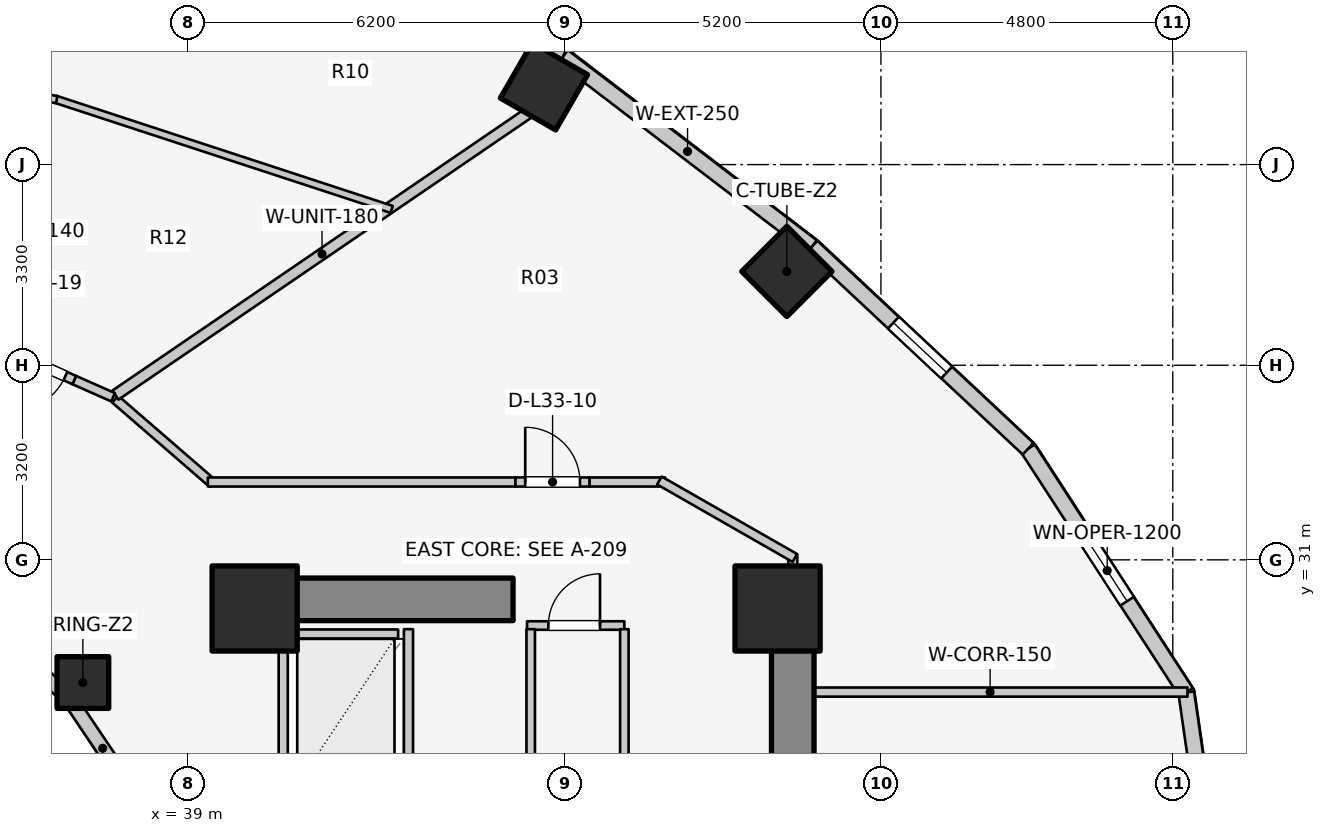
"""IFC4 building model, lengths in metres.
Left out: names, types, materials, properties, quantities, classifications, styles, units other than length and angle.
Written with IfcOpenShell. Run it as: python <this file> out.ifc"""

import sys

from ifc_helpers import new_model, si_unit, direction, frame, frame_2d, origin, origin_2d, place, context, subcontext, project, spatial, rectangle, extrude, element, fill, save


model = new_model("IFC4")
c1 = context("Model", 3, precision=1e-05, world=origin(), true_north=direction((0.0, 1.0)))
c2 = subcontext(c1, "Body", "Model", "MODEL_VIEW")
j1 = project(units=[si_unit("LENGTHUNIT", "METRE"), si_unit("PLANEANGLEUNIT", "RADIAN")], contexts=[c1])
p1 = place(None, origin())
s1 = spatial("IfcSite", under=j1, at=p1, CompositionType="ELEMENT")
p2 = place(p1, origin())
s2 = spatial("IfcBuilding", under=s1, at=p2, CompositionType="ELEMENT")
p3 = place(p2, frame((0.0, 0.0, 110.4)))
s3 = spatial("IfcBuildingStorey", under=s2, at=p3, CompositionType="ELEMENT", Elevation=110.4)
p4 = place(p3, frame((48.95, 17.05, 0.0), z_axis=(0.0, 0.0, 1.0), x_axis=(0.0, 1.0, 0.0)))
e1 = element("IfcWall", 1, at=p4, inside=s3, PredefinedType="SHEAR", context=c2, shape_type="SweptSolid", body=[
    extrude(rectangle(XDim=12.8, YDim=0.7, at=frame_2d((6.4, 0.0))), origin(), (0.0, 0.0, 1.0), 3.1),
])
p5 = place(p3, frame((39.85, 30.35, 0.0), z_axis=(0.0, 0.0, 1.0), x_axis=(1.0, 0.0, 0.0)))
e2 = element("IfcWall", 2, at=p5, inside=s3, PredefinedType="SHEAR", context=c2, shape_type="SweptSolid", body=[
    extrude(rectangle(XDim=4.5, YDim=0.7, at=frame_2d((2.25, 0.0))), origin(), (0.0, 0.0, 1.0), 3.1),
])
for number, where, z_axis, x_axis in (
    (3, (48.7, 30.2, 0.0), (0.0, 0.0, 1.0), (1.0, 0.0, 0.0)),
    (4, (40.1, 30.2, 0.0), (0.0, 0.0, 1.0), (1.0, 0.0, 0.0)),
):
    element("IfcColumn", number, at=place(p3, frame(where, z_axis=z_axis, x_axis=x_axis)), inside=s3, PredefinedType="COLUMN", context=c2, shape_type="SweptSolid", body=[
        extrude(rectangle(XDim=1.4, YDim=1.4, at=origin_2d()), origin(), (0.0, 0.0, 1.0), 3.1),
    ])
p6 = place(p3, frame((37.275, 28.982, 0.0), z_axis=(0.0, 0.0, 1.0), x_axis=(1.0, 0.0, 0.0)))
e5 = element("IfcColumn", 5, at=p6, inside=s3, PredefinedType="COLUMN", context=c2, shape_type="SweptSolid", body=[
    extrude(rectangle(XDim=0.85, YDim=0.85, at=origin_2d()), origin(), (0.0, 0.0, 1.0), 3.1),
])
for number, where, z_axis, x_axis in (
    (6, (48.853, 35.743, 0.0), (0.0, 0.0, 1.0), (0.707, 0.707, 0.0)),
    (7, (44.858, 38.786, 0.0), (0.0, 0.0, 1.0), (0.5, 0.866, 0.0)),
):
    element("IfcColumn", number, at=place(p3, frame(where, z_axis=z_axis, x_axis=x_axis)), inside=s3, PredefinedType="COLUMN", context=c2, shape_type="SweptSolid", body=[
        extrude(rectangle(XDim=1.05, YDim=1.05, at=origin_2d()), origin(), (0.0, 0.0, 1.0), 3.1),
    ])
p7 = place(p3, frame((38.166, 27.06, 0.0), z_axis=(0.0, 0.0, 1.0), x_axis=(-0.558197800898, 0.829707909492, 0.0)))
e8 = element("IfcWall", 8, at=p7, inside=s3, PredefinedType="STANDARD", context=c2, shape_type="SweptSolid", body=[
    extrude(rectangle(XDim=2.027, YDim=0.23, at=frame_2d((1.013, 0.0))), origin(), (0.0, 0.0, 1.0), 1.22),
])
p8 = place(p3, frame((37.035, 28.742, 0.0), z_axis=(0.0, 0.0, 1.0), x_axis=(-0.752576694707, 0.658504607869, 0.0)))
e9 = element("IfcWall", 9, at=p8, inside=s3, PredefinedType="STANDARD", context=c2, shape_type="SweptSolid", body=[
    extrude(rectangle(XDim=1.959, YDim=0.23, at=frame_2d((0.98, 0.0))), origin(), (0.0, 0.0, 1.0), 1.22),
])
p9 = place(p3, frame((56.26, 23.0, 0.0), z_axis=(0.0, 0.0, 1.0), x_axis=(-0.142572472068, 0.98978436551, 0.0)))
e10 = element("IfcWall", 10, at=p9, inside=s3, PredefinedType="STANDARD", context=c2, shape_type="SweptSolid", body=[
    extrude(rectangle(XDim=5.879, YDim=0.26, at=frame_2d((2.939, 0.0))), origin(), (0.0, 0.0, 1.0), 2.57),
])
p10 = place(p9, frame((2.189, 0.0, 0.75)))
e11 = element("IfcOpeningElement", 11, at=p10, cuts=e10, PredefinedType="OPENING", context=c2, shape_type="SweptSolid", body=[
    extrude(rectangle(XDim=1.5, YDim=1.6, at=frame_2d((0.75, 0.8))), frame((0.0, 0.14, 0.0), z_axis=(0.0, -1.0, 0.0), x_axis=(1.0, 0.0, 0.0)), (0.0, 0.0, 1.0), 0.28),
])
p11 = place(p3, frame((55.422, 28.819, 0.0), z_axis=(0.0, 0.0, 1.0), x_axis=(-0.544388392991, 0.838833283541, 0.0)))
e12 = element("IfcWall", 12, at=p11, inside=s3, PredefinedType="STANDARD", context=c2, shape_type="SweptSolid", body=[
    extrude(rectangle(XDim=4.778, YDim=0.26, at=frame_2d((2.389, 0.0))), origin(), (0.0, 0.0, 1.0), 1.22),
])
p12 = place(p11, frame((1.789, 0.0, 0.15)))
e13 = element("IfcOpeningElement", 13, at=p12, cuts=e12, PredefinedType="OPENING", context=c2, shape_type="SweptSolid", body=[
    extrude(rectangle(XDim=1.2, YDim=0.9, at=frame_2d((0.6, 0.45))), frame((0.0, 0.14, 0.0), z_axis=(0.0, -1.0, 0.0), x_axis=(1.0, 0.0, 0.0)), (0.0, 0.0, 1.0), 0.28),
])
p13 = place(p3, frame((52.821, 32.827, 0.0), z_axis=(0.0, 0.0, 1.0), x_axis=(-0.730162452258, 0.68327358599, 0.0)))
e14 = element("IfcWall", 14, at=p13, inside=s3, PredefinedType="STANDARD", context=c2, shape_type="SweptSolid", body=[
    extrude(rectangle(XDim=4.868, YDim=0.26, at=frame_2d((2.434, 0.0))), origin(), (0.0, 0.0, 1.0), 1.22),
])
p14 = place(p13, frame((1.834, 0.0, 0.15)))
e15 = element("IfcOpeningElement", 15, at=p14, cuts=e14, PredefinedType="OPENING", context=c2, shape_type="SweptSolid", body=[
    extrude(rectangle(XDim=1.2, YDim=0.9, at=frame_2d((0.6, 0.45))), frame((0.0, 0.14, 0.0), z_axis=(0.0, -1.0, 0.0), x_axis=(1.0, 0.0, 0.0)), (0.0, 0.0, 1.0), 0.28),
])
p15 = place(p3, frame((49.266, 36.153, 0.0), z_axis=(0.0, 0.0, 1.0), x_axis=(-0.794809810864, 0.606858603427, 0.0)))
e16 = element("IfcWall", 16, at=p15, inside=s3, PredefinedType="STANDARD", context=c2, shape_type="SweptSolid", body=[
    extrude(rectangle(XDim=5.149, YDim=0.26, at=frame_2d((2.575, 0.0))), origin(), (0.0, 0.0, 1.0), 1.22),
])
p16 = place(p3, frame((45.173, 39.278, 0.0), z_axis=(0.0, 0.0, 1.0), x_axis=(-0.914336605747, 0.404955023911, 0.0)))
e17 = element("IfcWall", 17, at=p16, inside=s3, PredefinedType="STANDARD", context=c2, shape_type="SweptSolid", body=[
    extrude(rectangle(XDim=5.859, YDim=0.26, at=frame_2d((2.929, 0.0))), origin(), (0.0, 0.0, 1.0), 1.22),
])
p17 = place(p16, frame((2.329, 0.0, 0.15)))
e18 = element("IfcOpeningElement", 18, at=p17, cuts=e17, PredefinedType="OPENING", context=c2, shape_type="SweptSolid", body=[
    extrude(rectangle(XDim=1.2, YDim=0.9, at=frame_2d((0.6, 0.45))), frame((0.0, 0.14, 0.0), z_axis=(0.0, -1.0, 0.0), x_axis=(1.0, 0.0, 0.0)), (0.0, 0.0, 1.0), 0.28),
])
p18 = place(p3, frame((40.74, 29.78, 0.0), z_axis=(0.0, 0.0, 1.0), x_axis=(1.0, 0.0, 0.0)))
e19 = element("IfcWall", 19, at=p18, inside=s3, PredefinedType="SOLIDWALL", context=c2, shape_type="SweptSolid", body=[
    extrude(rectangle(XDim=1.72, YDim=0.15, at=frame_2d((0.86, 0.0))), origin(), (0.0, 0.0, 1.0), 2.575),
])
for number, where, z_axis, x_axis in (
    (20, (40.57, 27.14, 0.0), (0.0, 0.0, 1.0), (0.0, 1.0, 0.0)),
    (21, (42.63, 27.14, 0.0), (0.0, 0.0, 1.0), (0.0, 1.0, 0.0)),
):
    element("IfcWall", number, at=place(p3, frame(where, z_axis=z_axis, x_axis=x_axis)), inside=s3, PredefinedType="SOLIDWALL", context=c2, shape_type="SweptSolid", body=[
        extrude(rectangle(XDim=2.72, YDim=0.15, at=frame_2d((1.36, 0.0))), origin(), (0.0, 0.0, 1.0), 2.575),
    ])
p19 = place(p3, frame((44.58, 29.92, 0.0), z_axis=(0.0, 0.0, 1.0), x_axis=(1.0, 0.0, 0.0)))
e22 = element("IfcWall", 22, at=p19, inside=s3, PredefinedType="PLUMBINGWALL", context=c2, shape_type="SweptSolid", body=[
    extrude(rectangle(XDim=1.6, YDim=0.14, at=frame_2d((0.8, 0.0))), origin(), (0.0, 0.0, 1.0), 2.575),
])
p20 = place(p19, frame((0.35, 0.0, 0.0)))
e23 = element("IfcOpeningElement", 23, at=p20, cuts=e22, PredefinedType="OPENING", context=c2, shape_type="SweptSolid", body=[
    extrude(rectangle(XDim=0.85, YDim=2.05, at=frame_2d((0.425, 1.025))), frame((0.0, 0.08, 0.0), z_axis=(0.0, -1.0, 0.0), x_axis=(1.0, 0.0, 0.0)), (0.0, 0.0, 1.0), 0.16),
])
for number, where, z_axis, x_axis in (
    (24, (44.64, 25.98, 0.0), (0.0, 0.0, 1.0), (0.0, 1.0, 0.0)),
    (25, (46.18, 25.98, 0.0), (0.0, 0.0, 1.0), (0.0, 1.0, 0.0)),
):
    element("IfcWall", number, at=place(p3, frame(where, z_axis=z_axis, x_axis=x_axis)), inside=s3, PredefinedType="PLUMBINGWALL", context=c2, shape_type="SweptSolid", body=[
        extrude(rectangle(XDim=3.88, YDim=0.14, at=frame_2d((1.94, 0.0))), origin(), (0.0, 0.0, 1.0), 2.575),
    ])
p21 = place(p3, frame((48.95, 28.825, 0.0), z_axis=(0.0, 0.0, 1.0), x_axis=(1.0, 0.0, 0.0)))
e26 = element("IfcWall", 26, at=p21, inside=s3, PredefinedType="PARTITIONING", context=c2, shape_type="SweptSolid", body=[
    extrude(rectangle(XDim=6.492, YDim=0.15, at=frame_2d((3.246, 0.0))), origin(), (0.0, 0.0, 1.0), 2.575),
])
p22 = place(p3, frame((48.95, 29.8, 0.0), z_axis=(0.0, 0.0, 1.0), x_axis=(0.0, 1.0, 0.0)))
e27 = element("IfcWall", 27, at=p22, inside=s3, PredefinedType="PARTITIONING", context=c2, shape_type="SweptSolid", body=[
    extrude(rectangle(XDim=1.29, YDim=0.15, at=frame_2d((0.645, 0.0))), origin(), (0.0, 0.0, 1.0), 1.22),
])
p23 = place(p3, frame((37.807, 33.642, 0.0), z_axis=(0.0, 0.0, 1.0), x_axis=(0.756055312247, -0.654507727092, 0.0)))
e28 = element("IfcWall", 28, at=p23, inside=s3, PredefinedType="PARTITIONING", context=c2, shape_type="SweptSolid", body=[
    extrude(rectangle(XDim=2.111, YDim=0.15, at=frame_2d((1.055, 0.0))), origin(), (0.0, 0.0, 1.0), 1.992),
])
p24 = place(p3, frame((39.33, 32.28, 0.0), z_axis=(0.0, 0.0, 1.0), x_axis=(1.0, 0.0, 0.0)))
e29 = element("IfcWall", 29, at=p24, inside=s3, PredefinedType="PARTITIONING", context=c2, shape_type="SweptSolid", body=[
    extrude(rectangle(XDim=5.06, YDim=0.15, at=frame_2d((2.53, 0.0))), origin(), (0.0, 0.0, 1.0), 1.992),
])
p25 = place(p3, frame((44.39, 32.28, 0.0), z_axis=(0.0, 0.0, 1.0), x_axis=(1.0, 0.0, 0.0)))
e30 = element("IfcWall", 30, at=p25, inside=s3, PredefinedType="PARTITIONING", context=c2, shape_type="SweptSolid", body=[
    extrude(rectangle(XDim=1.22, YDim=0.15, at=frame_2d((0.61, 0.0))), origin(), (0.0, 0.0, 1.0), 2.575),
])
p26 = place(p25, frame((0.16, 0.0, 0.0)))
e31 = element("IfcOpeningElement", 31, at=p26, cuts=e30, PredefinedType="OPENING", context=c2, shape_type="SweptSolid", body=[
    extrude(rectangle(XDim=0.9, YDim=2.1, at=frame_2d((0.45, 1.05))), frame((0.0, 0.085, 0.0), z_axis=(0.0, -1.0, 0.0), x_axis=(1.0, 0.0, 0.0)), (0.0, 0.0, 1.0), 0.17),
])
p27 = place(p3, frame((45.61, 32.28, 0.0), z_axis=(0.0, 0.0, 1.0), x_axis=(1.0, 0.0, 0.0)))
e32 = element("IfcWall", 32, at=p27, inside=s3, PredefinedType="PARTITIONING", context=c2, shape_type="SweptSolid", body=[
    extrude(rectangle(XDim=1.24, YDim=0.15, at=frame_2d((0.62, 0.0))), origin(), (0.0, 0.0, 1.0), 2.575),
])
p28 = place(p3, frame((46.757, 32.305, 0.0), z_axis=(0.0, 0.0, 1.0), x_axis=(0.867991349648, -0.496579315857, 0.0)))
e33 = element("IfcWall", 33, at=p28, inside=s3, PredefinedType="PARTITIONING", context=c2, shape_type="SweptSolid", body=[
    extrude(rectangle(XDim=2.567, YDim=0.15, at=frame_2d((1.283, 0.0))), origin(), (0.0, 0.0, 1.0), 1.22),
])
p29 = place(p3, frame((37.81, 33.709, 0.0), z_axis=(0.0, 0.0, 1.0), x_axis=(0.825850521911, 0.563889098546, 0.0)))
e34 = element("IfcWall", 34, at=p29, inside=s3, PredefinedType="PARTITIONING", context=c2, shape_type="SweptSolid", body=[
    extrude(rectangle(XDim=8.228, YDim=0.18, at=frame_2d((4.114, 0.0))), origin(), (0.0, 0.0, 1.0), 1.22),
])
p30 = place(p3, frame((42.354, 36.763, 0.0), z_axis=(0.0, 0.0, 1.0), x_axis=(-0.950307315297, 0.311313357396, 0.0)))
e35 = element("IfcWall", 35, at=p30, inside=s3, PredefinedType="MOVABLE", context=c2, shape_type="SweptSolid", body=[
    extrude(rectangle(XDim=5.817, YDim=0.12, at=frame_2d((2.909, 0.0))), origin(), (0.0, 0.0, 1.0), 1.992),
])
p31 = place(p3, frame((36.845, 38.57, 0.0), z_axis=(0.0, 0.0, 1.0), x_axis=(-0.987498427073, 0.157628856904, 0.0)))
e36 = element("IfcWall", 36, at=p31, inside=s3, PredefinedType="MOVABLE", context=c2, shape_type="SweptSolid", body=[
    extrude(rectangle(XDim=1.843, YDim=0.12, at=frame_2d((0.921, 0.0))), origin(), (0.0, 0.0, 1.0), 2.575),
])
p32 = place(p3, frame((37.772, 33.674, 0.0), z_axis=(0.0, 0.0, 1.0), x_axis=(-0.914415935028, 0.404775861148, 0.0)))
e37 = element("IfcWall", 37, at=p32, inside=s3, PredefinedType="PARTITIONING", context=c2, shape_type="SweptSolid", body=[
    extrude(rectangle(XDim=0.698, YDim=0.15, at=frame_2d((0.349, 0.0))), origin(), (0.0, 0.0, 1.0), 2.575),
])
p33 = place(p3, frame((37.133, 33.957, 0.0), z_axis=(0.0, 0.0, 1.0), x_axis=(-0.914283830307, 0.405074163134, 0.0)))
e38 = element("IfcWall", 38, at=p33, inside=s3, PredefinedType="PARTITIONING", context=c2, shape_type="SweptSolid", body=[
    extrude(rectangle(XDim=1.32, YDim=0.15, at=frame_2d((0.66, 0.0))), origin(), (0.0, 0.0, 1.0), 2.16),
])
p34 = place(p33, frame((0.16, 0.0, 0.0)))
e39 = element("IfcOpeningElement", 39, at=p34, cuts=e38, PredefinedType="OPENING", context=c2, shape_type="SweptSolid", body=[
    extrude(rectangle(XDim=1.0, YDim=2.1, at=frame_2d((0.5, 1.05))), frame((0.0, 0.085, 0.0), z_axis=(0.0, -1.0, 0.0), x_axis=(1.0, 0.0, 0.0)), (0.0, 0.0, 1.0), 0.17),
])
p35 = place(p12, origin())
e40 = element("IfcWindow", 40, at=p35, inside=s3, PartitioningType="SINGLE_PANEL", PredefinedType="WINDOW", context=c2, shape_type="SweptSolid", body=[
    extrude(rectangle(XDim=1.2, YDim=0.9, at=frame_2d((0.6, 0.45))), frame((0.0, 0.03, 0.0), z_axis=(0.0, -1.0, 0.0), x_axis=(1.0, 0.0, 0.0)), (0.0, 0.0, 1.0), 0.06),
])
fill(e13, e40)
p36 = place(p14, origin())
e41 = element("IfcWindow", 41, at=p36, inside=s3, PartitioningType="SINGLE_PANEL", PredefinedType="WINDOW", context=c2, shape_type="SweptSolid", body=[
    extrude(rectangle(XDim=1.2, YDim=0.9, at=frame_2d((0.6, 0.45))), frame((0.0, 0.03, 0.0), z_axis=(0.0, -1.0, 0.0), x_axis=(1.0, 0.0, 0.0)), (0.0, 0.0, 1.0), 0.06),
])
fill(e15, e41)
p37 = place(p20, origin())
e42 = element("IfcDoor", 42, at=p37, inside=s3, OperationType="SINGLE_SWING_RIGHT", PredefinedType="DOOR", context=c2, shape_type="SweptSolid", body=[
    extrude(rectangle(XDim=0.85, YDim=2.05, at=frame_2d((0.425, 1.025))), frame((0.0, 0.025, 0.0), z_axis=(0.0, -1.0, 0.0), x_axis=(1.0, 0.0, 0.0)), (0.0, 0.0, 1.0), 0.05),
])
fill(e23, e42)
p38 = place(p26, origin())
e43 = element("IfcDoor", 43, at=p38, inside=s3, OperationType="SINGLE_SWING_LEFT", PredefinedType="DOOR", context=c2, shape_type="SweptSolid", body=[
    extrude(rectangle(XDim=0.9, YDim=2.1, at=frame_2d((0.45, 1.05))), frame((0.0, 0.025, 0.0), z_axis=(0.0, -1.0, 0.0), x_axis=(1.0, 0.0, 0.0)), (0.0, 0.0, 1.0), 0.05),
])
fill(e31, e43)
p39 = place(p34, origin())
e44 = element("IfcDoor", 44, at=p39, inside=s3, OperationType="SINGLE_SWING_RIGHT", PredefinedType="DOOR", context=c2, shape_type="SweptSolid", body=[
    extrude(rectangle(XDim=1.0, YDim=2.1, at=frame_2d((0.5, 1.05))), frame((0.0, 0.025, 0.0), z_axis=(0.0, -1.0, 0.0), x_axis=(1.0, 0.0, 0.0)), (0.0, 0.0, 1.0), 0.05),
])
fill(e39, e44)
save(model, sys.argv[1])
